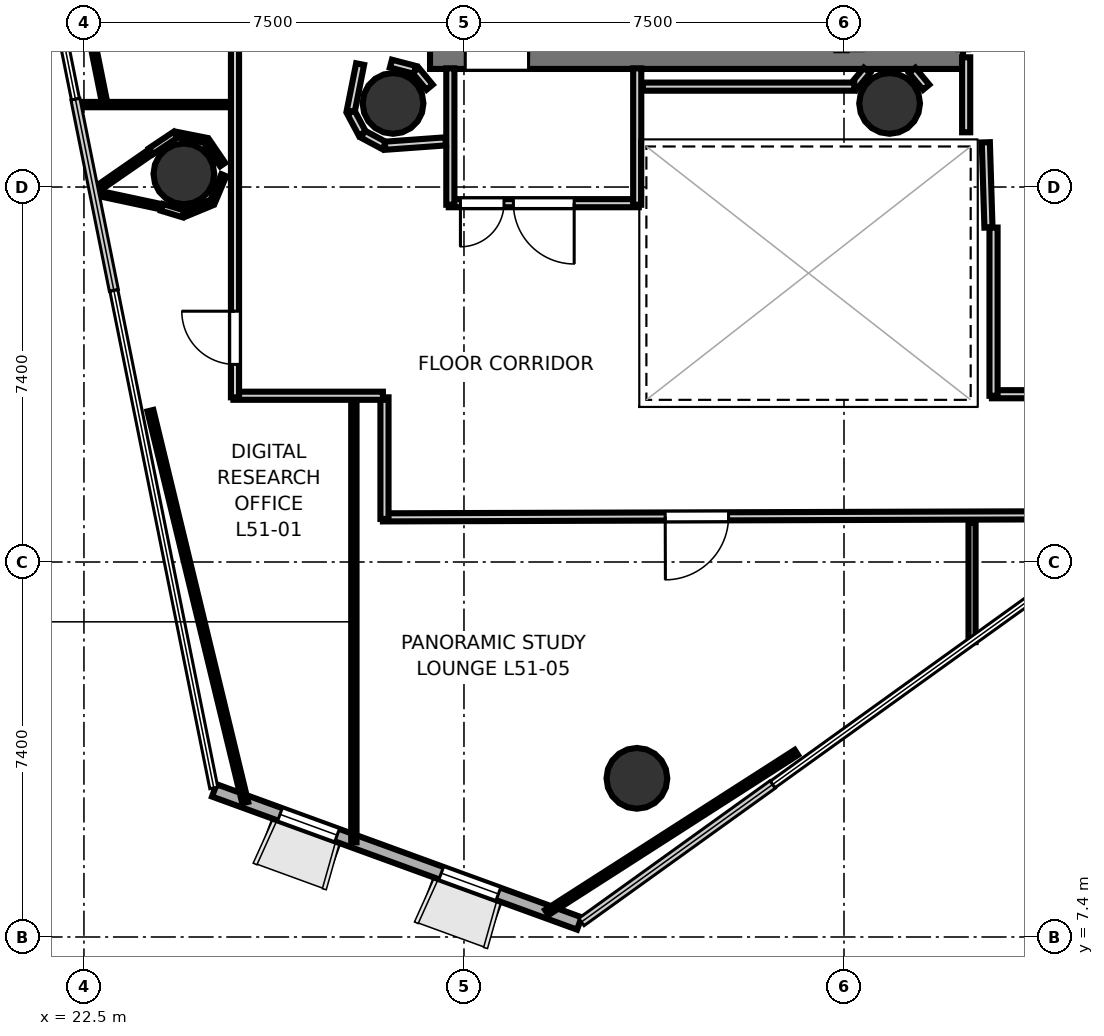
"""IFC4 building model, lengths in metres.
Left out: names, types, materials, properties, quantities, classifications, styles, units other than length and angle.
Written with IfcOpenShell. Run it as: python <this file> out.ifc"""

import sys

from ifc_helpers import new_model, si_unit, direction, frame, frame_2d, origin, origin_2d, place, context, subcontext, project, spatial, rectangle, hollow_circle, extrude, element, fill, save


model = new_model("IFC4")
c1 = context("Model", 3, precision=1e-05, world=origin(), true_north=direction((0.0, 1.0)))
c2 = subcontext(c1, "Body", "Model", "MODEL_VIEW")
j1 = project(units=[si_unit("LENGTHUNIT", "METRE"), si_unit("PLANEANGLEUNIT", "RADIAN")], contexts=[c1])
p1 = place(None, origin())
s1 = spatial("IfcSite", under=j1, at=p1, CompositionType="ELEMENT")
p2 = place(p1, origin())
s2 = spatial("IfcBuilding", under=s1, at=p2, CompositionType="ELEMENT")
p3 = place(p2, frame((0.0, 0.0, 200.3)))
s3 = spatial("IfcBuildingStorey", under=s2, at=p3, CompositionType="ELEMENT", Elevation=200.3)
p4 = place(p3, frame((29.33, 24.755, 0.0), z_axis=(0.0, 0.0, 1.0), x_axis=(1.0, 0.0, 0.0)))
e1 = element("IfcWall", 1, at=p4, inside=s3, PredefinedType="SHEAR", context=c2, shape_type="SweptSolid", body=[
    extrude(rectangle(XDim=10.52, YDim=0.45, at=frame_2d((5.26, 0.0))), origin(), (0.0, 0.0, 1.0), 3.52),
])
p5 = place(p4, frame((0.695, 0.0, 0.0)))
e2 = element("IfcOpeningElement", 2, at=p5, cuts=e1, PredefinedType="OPENING", context=c2, shape_type="SweptSolid", body=[
    extrude(rectangle(XDim=1.25, YDim=2.15, at=frame_2d((0.625, 1.075))), frame((0.0, 0.235, 0.0), z_axis=(0.0, -1.0, 0.0), x_axis=(1.0, 0.0, 0.0)), (0.0, 0.0, 1.0), 0.47),
])
for number, where, z_axis, x_axis in (
    (3, (28.6, 23.85, 0.0), (0.0, 0.0, 1.0), (1.0, 0.0, 0.0)),
    (4, (38.4, 23.85, 0.0), (0.0, 0.0, 1.0), (1.0, 0.0, 0.0)),
    (5, (24.472, 22.46, 0.0), (0.0, 0.0, 1.0), (1.0, 0.0, 0.0)),
    (6, (33.413, 10.531, 0.0), (0.0, 0.0, 1.0), (1.0, 0.0, 0.0)),
):
    element("IfcColumn", number, at=place(p3, frame(where, z_axis=z_axis, x_axis=x_axis)), inside=s3, PredefinedType="COLUMN", context=c2, shape_type="SweptSolid", body=[
        extrude(hollow_circle(Radius=0.6, WallThickness=0.03, at=origin_2d()), origin(), (0.0, 0.0, 1.0), 3.7),
    ])
p6 = place(p3, frame((25.072, 10.293, 0.0), z_axis=(0.0, 0.0, 1.0), x_axis=(0.939543106306, -0.342430651948, 0.0)))
e7 = element("IfcWall", 7, at=p6, inside=s3, PredefinedType="SOLIDWALL", context=c2, shape_type="SweptSolid", body=[
    extrude(rectangle(XDim=7.668, YDim=0.26, at=frame_2d((3.834, 0.0))), origin(), (0.0, 0.0, 1.0), 3.52),
])
p7 = place(p6, frame((1.38, 0.0, 0.9)))
e8 = element("IfcOpeningElement", 8, at=p7, cuts=e7, PredefinedType="OPENING", context=c2, shape_type="SweptSolid", body=[
    extrude(rectangle(XDim=1.2, YDim=2.0, at=frame_2d((0.6, 1.0))), frame((0.0, 0.14, 0.0), z_axis=(0.0, -1.0, 0.0), x_axis=(1.0, 0.0, 0.0)), (0.0, 0.0, 1.0), 0.28),
])
p8 = place(p6, frame((4.768, 0.0, 0.9)))
e9 = element("IfcOpeningElement", 9, at=p8, cuts=e7, PredefinedType="OPENING", context=c2, shape_type="SweptSolid", body=[
    extrude(rectangle(XDim=1.2, YDim=2.0, at=frame_2d((0.6, 1.0))), frame((0.0, 0.14, 0.0), z_axis=(0.0, -1.0, 0.0), x_axis=(1.0, 0.0, 0.0)), (0.0, 0.0, 1.0), 0.28),
])
p9 = place(p3, frame((33.45, 21.881, 0.0), z_axis=(0.0, 0.0, 1.0), x_axis=(-1.0, 0.0, 0.0)))
e10 = element("IfcWall", 10, at=p9, inside=s3, PredefinedType="PARTITIONING", context=c2, shape_type="SweptSolid", body=[
    extrude(rectangle(XDim=3.75, YDim=0.16, at=frame_2d((1.875, 0.0))), origin(), (0.0, 0.0, 1.0), 2.84),
])
p10 = place(p9, frame((1.275, 0.0, 0.0)))
e11 = element("IfcOpeningElement", 11, at=p10, cuts=e10, PredefinedType="OPENING", context=c2, shape_type="SweptSolid", body=[
    extrude(rectangle(XDim=1.2, YDim=2.15, at=frame_2d((0.6, 1.075))), frame((0.0, 0.09, 0.0), z_axis=(0.0, -1.0, 0.0), x_axis=(1.0, 0.0, 0.0)), (0.0, 0.0, 1.0), 0.18),
])
p11 = place(p9, frame((2.66, 0.0, 0.0)))
e12 = element("IfcOpeningElement", 12, at=p11, cuts=e10, PredefinedType="OPENING", context=c2, shape_type="SweptSolid", body=[
    extrude(rectangle(XDim=0.86, YDim=2.05, at=frame_2d((0.43, 1.025))), frame((0.0, 0.09, 0.0), z_axis=(0.0, -1.0, 0.0), x_axis=(1.0, 0.0, 0.0)), (0.0, 0.0, 1.0), 0.18),
])
for number, where, z_axis, x_axis in (
    (13, (29.731, 21.85, 0.0), (0.0, 0.0, 1.0), (0.0, 1.0, 0.0)),
    (14, (33.419, 24.542, 0.0), (0.0, 0.0, 1.0), (0.0, -1.0, 0.0)),
):
    element("IfcWall", number, at=place(p3, frame(where, z_axis=z_axis, x_axis=x_axis)), inside=s3, PredefinedType="PARTITIONING", context=c2, shape_type="SweptSolid", body=[
        extrude(rectangle(XDim=2.692, YDim=0.16, at=frame_2d((1.346, 0.0))), origin(), (0.0, 0.0, 1.0), 2.84),
    ])
p12 = place(p3, frame((40.351, 21.401, 0.0), z_axis=(0.0, 0.0, 1.0), x_axis=(-0.031058045979, 0.999517582527, 0.0)))
e15 = element("IfcWall", 15, at=p12, inside=s3, PredefinedType="PARTITIONING", context=c2, shape_type="SweptSolid", body=[
    extrude(rectangle(XDim=1.682, YDim=0.16, at=frame_2d((0.841, 0.0))), origin(), (0.0, 0.0, 1.0), 2.84),
])
p13 = place(p3, frame((39.911, 23.28, 0.0), z_axis=(0.0, 0.0, 1.0), x_axis=(0.0, 1.0, 0.0)))
e16 = element("IfcWall", 16, at=p13, inside=s3, PredefinedType="PARTITIONING", context=c2, shape_type="SweptSolid", body=[
    extrude(rectangle(XDim=1.48, YDim=0.16, at=frame_2d((0.74, 0.0))), origin(), (0.0, 0.0, 1.0), 2.84),
])
p14 = place(p3, frame((43.15, 18.111, 0.0), z_axis=(0.0, 0.0, 1.0), x_axis=(-1.0, 0.0, 0.0)))
e17 = element("IfcWall", 17, at=p14, inside=s3, PredefinedType="PARTITIONING", context=c2, shape_type="SweptSolid", body=[
    extrude(rectangle(XDim=2.73, YDim=0.16, at=frame_2d((1.365, 0.0))), origin(), (0.0, 0.0, 1.0), 2.84),
])
p15 = place(p14, frame((0.765, 0.0, 0.0)))
e18 = element("IfcOpeningElement", 18, at=p15, cuts=e17, PredefinedType="OPENING", context=c2, shape_type="SweptSolid", body=[
    extrude(rectangle(XDim=1.2, YDim=2.15, at=frame_2d((0.6, 1.075))), frame((0.0, 0.09, 0.0), z_axis=(0.0, -1.0, 0.0), x_axis=(1.0, 0.0, 0.0)), (0.0, 0.0, 1.0), 0.18),
])
p16 = place(p3, frame((40.451, 18.08, 0.0), z_axis=(0.0, 0.0, 1.0), x_axis=(0.0, 1.0, 0.0)))
e19 = element("IfcWall", 19, at=p16, inside=s3, PredefinedType="PARTITIONING", context=c2, shape_type="SweptSolid", body=[
    extrude(rectangle(XDim=3.32, YDim=0.16, at=frame_2d((1.66, 0.0))), origin(), (0.0, 0.0, 1.0), 2.84),
])
p17 = place(p3, frame((29.321, 24.17, 0.0), z_axis=(0.0, 0.0, 1.0), x_axis=(-0.638008265708, 0.770029514296, 0.0)))
e20 = element("IfcWall", 20, at=p17, inside=s3, PredefinedType="PARTITIONING", context=c2, shape_type="SweptSolid", body=[
    extrude(rectangle(XDim=0.431, YDim=0.16, at=frame_2d((0.215, 0.0))), origin(), (0.0, 0.0, 1.0), 2.84),
])
p18 = place(p3, frame((29.03, 24.512, 0.0), z_axis=(0.0, 0.0, 1.0), x_axis=(-0.967681003213, 0.252177469296, 0.0)))
e21 = element("IfcWall", 21, at=p18, inside=s3, PredefinedType="PARTITIONING", context=c2, shape_type="SweptSolid", body=[
    extrude(rectangle(XDim=0.488, YDim=0.16, at=frame_2d((0.244, 0.0))), origin(), (0.0, 0.0, 1.0), 2.84),
])
for number, where, z_axis, x_axis in (
    (22, (39.121, 24.17, 0.0), (0.0, 0.0, 1.0), (-0.638, 0.77, 0.0)),
    (23, (37.954, 24.502, 0.0), (0.0, 0.0, 1.0), (-0.638, -0.77, 0.0)),
):
    element("IfcWall", number, at=place(p3, frame(where, z_axis=z_axis, x_axis=x_axis)), inside=s3, PredefinedType="PARTITIONING", context=c2, shape_type="SweptSolid", body=[
        extrude(rectangle(XDim=0.431, YDim=0.16, at=frame_2d((0.215, 0.0))), origin(), (0.0, 0.0, 1.0), 2.84),
    ])
p19 = place(p3, frame((37.703, 24.181, 0.0), z_axis=(0.0, 0.0, 1.0), x_axis=(-1.0, 0.0, 0.0)))
e24 = element("IfcWall", 24, at=p19, inside=s3, PredefinedType="PARTITIONING", context=c2, shape_type="SweptSolid", body=[
    extrude(rectangle(XDim=4.173, YDim=0.16, at=frame_2d((2.086, 0.0))), origin(), (0.0, 0.0, 1.0), 2.84),
])
p20 = place(p3, frame((27.95, 24.626, 0.0), z_axis=(0.0, 0.0, 1.0), x_axis=(-0.195125950178, -0.980778192848, 0.0)))
e25 = element("IfcWall", 25, at=p20, inside=s3, PredefinedType="PARTITIONING", context=c2, shape_type="SweptSolid", body=[
    extrude(rectangle(XDim=0.948, YDim=0.16, at=frame_2d((0.474, 0.0))), origin(), (0.0, 0.0, 1.0), 2.84),
])
for number, where, z_axis, x_axis in (
    (26, (27.768, 23.675, 0.0), (0.0, 0.0, 1.0), (0.472, -0.882, 0.0)),
    (27, (28.006, 23.243, 0.0), (0.0, 0.0, 1.0), (0.882, -0.472, 0.0)),
):
    element("IfcWall", number, at=place(p3, frame(where, z_axis=z_axis, x_axis=x_axis)), inside=s3, PredefinedType="PARTITIONING", context=c2, shape_type="SweptSolid", body=[
        extrude(rectangle(XDim=0.476, YDim=0.16, at=frame_2d((0.238, 0.0))), origin(), (0.0, 0.0, 1.0), 2.84),
    ])
p21 = place(p3, frame((28.442, 23.015, 0.0), z_axis=(0.0, 0.0, 1.0), x_axis=(0.99740683837, 0.07196942943, 0.0)))
e28 = element("IfcWall", 28, at=p21, inside=s3, PredefinedType="PARTITIONING", context=c2, shape_type="SweptSolid", body=[
    extrude(rectangle(XDim=1.201, YDim=0.16, at=frame_2d((0.601, 0.0))), origin(), (0.0, 0.0, 1.0), 2.84),
])
p22 = place(p3, frame((43.508, 15.727, 0.0), z_axis=(0.0, 0.0, 1.0), x_axis=(-0.999995335964, -0.003054185684, 0.0)))
e29 = element("IfcWall", 29, at=p22, inside=s3, PredefinedType="PARTITIONING", context=c2, shape_type="SweptSolid", body=[
    extrude(rectangle(XDim=15.108, YDim=0.16, at=frame_2d((7.554, 0.0))), origin(), (0.0, 0.0, 1.0), 2.84),
])
p23 = place(p22, frame((8.287, 0.0, 0.0)))
e30 = element("IfcOpeningElement", 30, at=p23, cuts=e29, PredefinedType="OPENING", context=c2, shape_type="SweptSolid", body=[
    extrude(rectangle(XDim=1.25, YDim=2.2, at=frame_2d((0.625, 1.1))), frame((0.0, 0.09, 0.0), z_axis=(0.0, -1.0, 0.0), x_axis=(1.0, 0.0, 0.0)), (0.0, 0.0, 1.0), 0.18),
])
p24 = place(p3, frame((28.431, 15.65, 0.0), z_axis=(0.0, 0.0, 1.0), x_axis=(0.0, 1.0, 0.0)))
e31 = element("IfcWall", 31, at=p24, inside=s3, PredefinedType="PARTITIONING", context=c2, shape_type="SweptSolid", body=[
    extrude(rectangle(XDim=2.4, YDim=0.16, at=frame_2d((1.2, 0.0))), origin(), (0.0, 0.0, 1.0), 2.84),
])
p25 = place(p3, frame((28.4, 18.081, 0.0), z_axis=(0.0, 0.0, 1.0), x_axis=(-1.0, 0.0, 0.0)))
e32 = element("IfcWall", 32, at=p25, inside=s3, PredefinedType="PARTITIONING", context=c2, shape_type="SweptSolid", body=[
    extrude(rectangle(XDim=2.95, YDim=0.16, at=frame_2d((1.475, 0.0))), origin(), (0.0, 0.0, 1.0), 2.84),
])
p26 = place(p3, frame((25.481, 18.05, 0.0), z_axis=(0.0, 0.0, 1.0), x_axis=(0.0, 1.0, 0.0)))
e33 = element("IfcWall", 33, at=p26, inside=s3, PredefinedType="PARTITIONING", context=c2, shape_type="SweptSolid", body=[
    extrude(rectangle(XDim=18.219, YDim=0.16, at=frame_2d((9.109, 0.0))), origin(), (0.0, 0.0, 1.0), 2.84),
])
p27 = place(p26, frame((0.649, 0.0, 0.0)))
e34 = element("IfcOpeningElement", 34, at=p27, cuts=e33, PredefinedType="OPENING", context=c2, shape_type="SweptSolid", body=[
    extrude(rectangle(XDim=1.05, YDim=2.15, at=frame_2d((0.525, 1.075))), frame((0.0, 0.09, 0.0), z_axis=(0.0, -1.0, 0.0), x_axis=(1.0, 0.0, 0.0)), (0.0, 0.0, 1.0), 0.18),
])
p28 = place(p26, frame((9.975, 0.0, 0.0)))
e35 = element("IfcOpeningElement", 35, at=p28, cuts=e33, PredefinedType="OPENING", context=c2, shape_type="SweptSolid", body=[
    extrude(rectangle(XDim=1.25, YDim=2.2, at=frame_2d((0.625, 1.1))), frame((0.0, 0.09, 0.0), z_axis=(0.0, -1.0, 0.0), x_axis=(1.0, 0.0, 0.0)), (0.0, 0.0, 1.0), 0.18),
])
p29 = place(p3, frame((25.238, 22.644, 0.0), z_axis=(0.0, 0.0, 1.0), x_axis=(-0.563363697458, 0.826209019792, 0.0)))
e36 = element("IfcWall", 36, at=p29, inside=s3, PredefinedType="PARTITIONING", context=c2, shape_type="SweptSolid", body=[
    extrude(rectangle(XDim=0.564, YDim=0.12, at=frame_2d((0.282, 0.0))), origin(), (0.0, 0.0, 1.0), 2.84),
])
p30 = place(p3, frame((24.9, 23.122, 0.0), z_axis=(0.0, 0.0, 1.0), x_axis=(-0.980773892286, 0.195147565217, 0.0)))
e37 = element("IfcWall", 37, at=p30, inside=s3, PredefinedType="PARTITIONING", context=c2, shape_type="SweptSolid", body=[
    extrude(rectangle(XDim=0.582, YDim=0.105, at=frame_2d((0.291, 0.0))), origin(), (0.0, 0.0, 1.0), 2.84),
])
p31 = place(p3, frame((24.306, 23.231, 0.0), z_axis=(0.0, 0.0, 1.0), x_axis=(-0.831274401047, -0.555862276256, 0.0)))
e38 = element("IfcWall", 38, at=p31, inside=s3, PredefinedType="PARTITIONING", context=c2, shape_type="SweptSolid", body=[
    extrude(rectangle(XDim=0.582, YDim=0.14, at=frame_2d((0.291, 0.0))), origin(), (0.0, 0.0, 1.0), 2.84),
])
p32 = place(p3, frame((23.81, 22.888, 0.0), z_axis=(0.0, 0.0, 1.0), x_axis=(-0.821958461882, -0.569547440466, 0.0)))
e39 = element("IfcWall", 39, at=p32, inside=s3, PredefinedType="PARTITIONING", context=c2, shape_type="SweptSolid", body=[
    extrude(rectangle(XDim=1.354, YDim=0.12, at=frame_2d((0.677, 0.0))), origin(), (0.0, 0.0, 1.0), 2.84),
])
p33 = place(p3, frame((22.701, 22.094, 0.0), z_axis=(0.0, 0.0, 1.0), x_axis=(0.977868408838, -0.209220876102, 0.0)))
e40 = element("IfcWall", 40, at=p33, inside=s3, PredefinedType="PARTITIONING", context=c2, shape_type="SweptSolid", body=[
    extrude(rectangle(XDim=1.353, YDim=0.105, at=frame_2d((0.676, 0.0))), origin(), (0.0, 0.0, 1.0), 2.84),
])
p34 = place(p3, frame((24.041, 21.798, 0.0), z_axis=(0.0, 0.0, 1.0), x_axis=(0.957015093463, -0.290038119708, 0.0)))
e41 = element("IfcWall", 41, at=p34, inside=s3, PredefinedType="PARTITIONING", context=c2, shape_type="SweptSolid", body=[
    extrude(rectangle(XDim=0.441, YDim=0.14, at=frame_2d((0.221, 0.0))), origin(), (0.0, 0.0, 1.0), 2.84),
])
p35 = place(p3, frame((24.484, 21.671, 0.0), z_axis=(0.0, 0.0, 1.0), x_axis=(0.923832639322, 0.382796622927, 0.0)))
e42 = element("IfcWall", 42, at=p35, inside=s3, PredefinedType="PARTITIONING", context=c2, shape_type="SweptSolid", body=[
    extrude(rectangle(XDim=0.582, YDim=0.12, at=frame_2d((0.291, 0.0))), origin(), (0.0, 0.0, 1.0), 2.84),
])
p36 = place(p3, frame((25.038, 21.91, 0.0), z_axis=(0.0, 0.0, 1.0), x_axis=(0.389093528864, 0.921198255424, 0.0)))
e43 = element("IfcWall", 43, at=p36, inside=s3, PredefinedType="PARTITIONING", context=c2, shape_type="SweptSolid", body=[
    extrude(rectangle(XDim=0.568, YDim=0.105, at=frame_2d((0.284, 0.0))), origin(), (0.0, 0.0, 1.0), 2.84),
])
p37 = place(p3, frame((27.827, 17.97, 0.0), z_axis=(0.0, 0.0, 1.0), x_axis=(0.0, -1.0, 0.0)))
e44 = element("IfcWall", 44, at=p37, inside=s3, PredefinedType="PARTITIONING", context=c2, shape_type="SweptSolid", body=[
    extrude(rectangle(XDim=8.701, YDim=0.105, at=frame_2d((4.351, 0.0))), origin(), (0.0, 0.0, 1.0), 2.84),
])
p38 = place(p3, frame((25.683, 10.052, 0.0), z_axis=(0.0, 0.0, 1.0), x_axis=(-0.23515832832, 0.971957077561, 0.0)))
e45 = element("IfcWall", 45, at=p38, inside=s3, PredefinedType="PARTITIONING", context=c2, shape_type="SweptSolid", body=[
    extrude(rectangle(XDim=7.958, YDim=0.12, at=frame_2d((3.979, 0.0))), origin(), (0.0, 0.0, 1.0), 2.84),
])
p39 = place(p3, frame((22.333, 23.827, 0.0), z_axis=(0.0, 0.0, 1.0), x_axis=(1.0, 0.0, 0.0)))
e46 = element("IfcWall", 46, at=p39, inside=s3, PredefinedType="PARTITIONING", context=c2, shape_type="SweptSolid", body=[
    extrude(rectangle(XDim=3.037, YDim=0.105, at=frame_2d((1.519, 0.0))), origin(), (0.0, 0.0, 1.0), 2.84),
])
p40 = place(p3, frame((22.891, 23.948, 0.0), z_axis=(0.0, 0.0, 1.0), x_axis=(-0.196981324141, 0.980407240865, 0.0)))
e47 = element("IfcWall", 47, at=p40, inside=s3, PredefinedType="PARTITIONING", context=c2, shape_type="SweptSolid", body=[
    extrude(rectangle(XDim=9.604, YDim=0.105, at=frame_2d((4.802, 0.0))), origin(), (0.0, 0.0, 1.0), 2.84),
])
p41 = place(p3, frame((40.027, 15.57, 0.0), z_axis=(0.0, 0.0, 1.0), x_axis=(0.0, -1.0, 0.0)))
e48 = element("IfcWall", 48, at=p41, inside=s3, PredefinedType="PARTITIONING", context=c2, shape_type="SweptSolid", body=[
    extrude(rectangle(XDim=2.351, YDim=0.14, at=frame_2d((1.176, 0.0))), origin(), (0.0, 0.0, 1.0), 2.84),
])
p42 = place(p3, frame((36.56, 11.042, 0.0), z_axis=(0.0, 0.0, 1.0), x_axis=(-0.841821781246, -0.539755582296, 0.0)))
e49 = element("IfcWall", 49, at=p42, inside=s3, PredefinedType="PARTITIONING", context=c2, shape_type="SweptSolid", body=[
    extrude(rectangle(XDim=5.852, YDim=0.12, at=frame_2d((2.926, 0.0))), origin(), (0.0, 0.0, 1.0), 2.84),
])
p43 = place(p5, origin())
e50 = element("IfcDoor", 50, at=p43, inside=s3, OperationType="SINGLE_SWING_RIGHT", PredefinedType="DOOR", context=c2, shape_type="SweptSolid", body=[
    extrude(rectangle(XDim=1.25, YDim=2.15, at=frame_2d((0.625, 1.075))), frame((0.0, 0.025, 0.0), z_axis=(0.0, -1.0, 0.0), x_axis=(1.0, 0.0, 0.0)), (0.0, 0.0, 1.0), 0.05),
])
fill(e2, e50)
p44 = place(p10, origin())
e51 = element("IfcDoor", 51, at=p44, inside=s3, OperationType="SINGLE_SWING_LEFT", PredefinedType="DOOR", context=c2, shape_type="SweptSolid", body=[
    extrude(rectangle(XDim=1.2, YDim=2.15, at=frame_2d((0.6, 1.075))), frame((0.0, 0.025, 0.0), z_axis=(0.0, -1.0, 0.0), x_axis=(1.0, 0.0, 0.0)), (0.0, 0.0, 1.0), 0.05),
])
fill(e11, e51)
p45 = place(p11, origin())
e52 = element("IfcDoor", 52, at=p45, inside=s3, OperationType="SINGLE_SWING_RIGHT", PredefinedType="DOOR", context=c2, shape_type="SweptSolid", body=[
    extrude(rectangle(XDim=0.86, YDim=2.05, at=frame_2d((0.43, 1.025))), frame((0.0, 0.025, 0.0), z_axis=(0.0, -1.0, 0.0), x_axis=(1.0, 0.0, 0.0)), (0.0, 0.0, 1.0), 0.05),
])
fill(e12, e52)
p46 = place(p27, origin())
e53 = element("IfcDoor", 53, at=p46, inside=s3, OperationType="SINGLE_SWING_RIGHT", PredefinedType="DOOR", context=c2, shape_type="SweptSolid", body=[
    extrude(rectangle(XDim=1.05, YDim=2.15, at=frame_2d((0.525, 1.075))), frame((0.0, 0.025, 0.0), z_axis=(0.0, -1.0, 0.0), x_axis=(1.0, 0.0, 0.0)), (0.0, 0.0, 1.0), 0.05),
])
fill(e34, e53)
p47 = place(p23, origin())
e54 = element("IfcDoor", 54, at=p47, inside=s3, OperationType="SINGLE_SWING_RIGHT", PredefinedType="DOOR", context=c2, shape_type="SweptSolid", body=[
    extrude(rectangle(XDim=1.25, YDim=2.2, at=frame_2d((0.625, 1.1))), frame((0.0, 0.025, 0.0), z_axis=(0.0, -1.0, 0.0), x_axis=(1.0, 0.0, 0.0)), (0.0, 0.0, 1.0), 0.05),
])
fill(e30, e54)
p48 = place(p7, origin())
e55 = element("IfcWindow", 55, at=p48, inside=s3, PartitioningType="SINGLE_PANEL", PredefinedType="WINDOW", context=c2, shape_type="SweptSolid", body=[
    extrude(rectangle(XDim=1.2, YDim=2.0, at=frame_2d((0.6, 1.0))), frame((0.0, 0.03, 0.0), z_axis=(0.0, -1.0, 0.0), x_axis=(1.0, 0.0, 0.0)), (0.0, 0.0, 1.0), 0.06),
])
fill(e8, e55)
p49 = place(p8, origin())
e56 = element("IfcWindow", 56, at=p49, inside=s3, PartitioningType="SINGLE_PANEL", PredefinedType="WINDOW", context=c2, shape_type="SweptSolid", body=[
    extrude(rectangle(XDim=1.2, YDim=2.0, at=frame_2d((0.6, 1.0))), frame((0.0, 0.03, 0.0), z_axis=(0.0, -1.0, 0.0), x_axis=(1.0, 0.0, 0.0)), (0.0, 0.0, 1.0), 0.06),
])
fill(e9, e56)
save(model, sys.argv[1])
